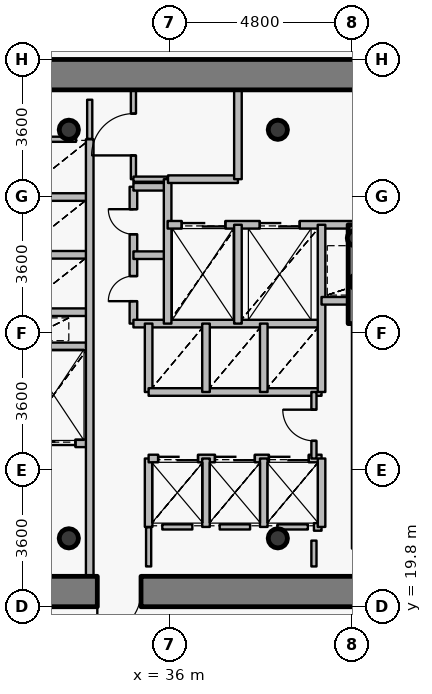
"""IFC4 building model, lengths in metres.
Left out: names, types, materials, properties, quantities, classifications, styles, units other than length and angle.
Written with IfcOpenShell. Run it as: python <this file> out.ifc"""

import sys

from ifc_helpers import new_model, si_unit, direction, frame, frame_2d, origin, origin_2d, place, context, subcontext, project, spatial, rectangle, hollow_circle, extrude, source, transform, mapped, element, fill, save


model = new_model("IFC4")
c1 = context("Model", 3, precision=1e-05, world=origin(), true_north=direction((0.0, 1.0)))
c2 = subcontext(c1, "Body", "Model", "MODEL_VIEW")
j1 = project(units=[si_unit("LENGTHUNIT", "METRE"), si_unit("PLANEANGLEUNIT", "RADIAN")], contexts=[c1])
p1 = place(None, origin())
s1 = spatial("IfcSite", under=j1, at=p1, CompositionType="ELEMENT")
p2 = place(p1, origin())
s2 = spatial("IfcBuilding", under=s1, at=p2, CompositionType="ELEMENT")
p3 = place(p2, frame((0.0, 0.0, 97.2)))
s3 = spatial("IfcBuildingStorey", under=s2, at=p3, CompositionType="ELEMENT", Elevation=97.2)
for number, where, z_axis, x_axis in (
    (1, (33.35, 21.6, 0.0), (0.0, 0.0, 1.0), (1.0, 0.0, 0.0)),
    (2, (38.85, 21.6, 0.0), (0.0, 0.0, 1.0), (1.0, 0.0, 0.0)),
    (3, (38.85, 32.35, 0.0), (0.0, 0.0, 1.0), (1.0, 0.0, 0.0)),
    (4, (33.35, 32.35, 0.0), (0.0, 0.0, 1.0), (1.0, 0.0, 0.0)),
):
    element("IfcColumn", number, at=place(p3, frame(where, z_axis=z_axis, x_axis=x_axis)), inside=s3, PredefinedType="COLUMN", context=c2, shape_type="SweptSolid", body=[
        extrude(hollow_circle(Radius=0.254, WallThickness=0.02, at=origin_2d()), origin(), (0.0, 0.0, 1.0), 3.75),
    ])
for number, where, z_axis, x_axis in (
    (5, (40.95, 28.35, 0.0), (0.0, 0.0, 1.0), (1.0, 0.0, 0.0)),
    (6, (40.88, 29.5, 0.0), (0.0, 0.0, 1.0), (1.0, 0.0, 0.0)),
):
    element("IfcColumn", number, at=place(p3, frame(where, z_axis=z_axis, x_axis=x_axis)), inside=s3, PredefinedType="COLUMN", context=c2, shape_type="SweptSolid", body=[
        extrude(hollow_circle(Radius=0.203, WallThickness=0.016, at=origin_2d()), origin(), (0.0, 0.0, 1.0), 3.75),
    ])
p4 = place(p3, frame((26.6, 33.8, 0.0), z_axis=(0.0, 0.0, 1.0), x_axis=(1.0, 0.0, 0.0)))
e7 = element("IfcWall", 7, at=p4, inside=s3, PredefinedType="SHEAR", context=c2, shape_type="SweptSolid", body=[
    extrude(rectangle(XDim=18.8, YDim=0.8, at=frame_2d((9.4, 0.0))), origin(), (0.0, 0.0, 1.0), 2.95),
])
p5 = place(p3, frame((45.4, 20.2, 0.0), z_axis=(0.0, 0.0, 1.0), x_axis=(-1.0, 0.0, 0.0)))
e8 = element("IfcWall", 8, at=p5, inside=s3, PredefinedType="SHEAR", context=c2, shape_type="SweptSolid", body=[
    extrude(rectangle(XDim=18.8, YDim=0.8, at=frame_2d((9.4, 0.0))), origin(), (0.0, 0.0, 1.0), 2.95),
])
p6 = place(p5, frame((10.15, 0.0, 0.0)))
e9 = element("IfcOpeningElement", 9, at=p6, cuts=e8, PredefinedType="OPENING", context=c2, shape_type="SweptSolid", body=[
    extrude(rectangle(XDim=1.15, YDim=2.15, at=origin_2d()), frame((0.575, 0.41, 1.075), z_axis=(0.0, -1.0, 0.0), x_axis=(1.0, 0.0, 0.0)), (0.0, 0.0, 1.0), 0.82),
])
p7 = place(p3, frame((40.9, 27.25, 0.0), z_axis=(0.0, 0.0, 1.0), x_axis=(0.0, 1.0, 0.0)))
e10 = element("IfcWall", 10, at=p7, inside=s3, PredefinedType="SHEAR", context=c2, shape_type="SweptSolid", body=[
    extrude(rectangle(XDim=2.6, YDim=0.4, at=frame_2d((1.3, 0.0))), origin(), (0.0, 0.0, 1.0), 3.1),
])
p8 = place(p3, frame((32.0, 24.1, 0.0), z_axis=(0.0, 0.0, 1.0), x_axis=(1.0, 0.0, 0.0)))
e11 = element("IfcWall", 11, at=p8, inside=s3, PredefinedType="PARTITIONING", context=c2, shape_type="SweptSolid", body=[
    extrude(rectangle(XDim=1.9, YDim=0.2, at=frame_2d((0.95, 0.0))), origin(), (0.0, 0.0, 1.0), 3.085),
])
p9 = place(p8, frame((0.375, 0.0, 0.0)))
e12 = element("IfcOpeningElement", 12, at=p9, cuts=e11, PredefinedType="OPENING", context=c2, shape_type="SweptSolid", body=[
    extrude(rectangle(XDim=1.15, YDim=2.15, at=origin_2d()), frame((0.575, 0.11, 1.075), z_axis=(0.0, -1.0, 0.0), x_axis=(1.0, 0.0, 0.0)), (0.0, 0.0, 1.0), 0.22),
])
for number, where, z_axis, x_axis in (
    (13, (32.0, 26.65, 0.0), (0.0, 0.0, 1.0), (1.0, 0.0, 0.0)),
    (14, (32.0, 27.55, 0.0), (0.0, 0.0, 1.0), (1.0, 0.0, 0.0)),
    (15, (32.0, 29.06, 0.0), (0.0, 0.0, 1.0), (1.0, 0.0, 0.0)),
    (16, (32.0, 30.58, 0.0), (0.0, 0.0, 1.0), (1.0, 0.0, 0.0)),
):
    element("IfcWall", number, at=place(p3, frame(where, z_axis=z_axis, x_axis=x_axis)), inside=s3, PredefinedType="PARTITIONING", context=c2, shape_type="SweptSolid", body=[
        extrude(rectangle(XDim=1.9, YDim=0.2, at=frame_2d((0.95, 0.0))), origin(), (0.0, 0.0, 1.0), 3.085),
    ])
p10 = place(p3, frame((33.9, 20.6, 0.0), z_axis=(0.0, 0.0, 1.0), x_axis=(0.0, 1.0, 0.0)))
e17 = element("IfcWall", 17, at=p10, inside=s3, PredefinedType="PARTITIONING", context=c2, shape_type="SweptSolid", body=[
    extrude(rectangle(XDim=11.5, YDim=0.2, at=frame_2d((5.75, 0.0))), origin(), (0.0, 0.0, 1.0), 3.085),
])
p11 = place(p3, frame((35.05, 27.25, 0.0), z_axis=(0.0, 0.0, 1.0), x_axis=(0.0, 1.0, 0.0)))
e18 = element("IfcWall", 18, at=p11, inside=s3, PredefinedType="PARTITIONING", context=c2, shape_type="SweptSolid", body=[
    extrude(rectangle(XDim=3.6, YDim=0.2, at=frame_2d((1.8, 0.0))), origin(), (0.0, 0.0, 1.0), 3.5),
])
p12 = place(p11, frame((0.59, 0.0, 0.0)))
e19 = element("IfcOpeningElement", 19, at=p12, cuts=e18, PredefinedType="OPENING", context=c2, shape_type="SweptSolid", body=[
    extrude(rectangle(XDim=0.66, YDim=2.05, at=origin_2d()), frame((0.33, 0.11, 1.025), z_axis=(0.0, -1.0, 0.0), x_axis=(1.0, 0.0, 0.0)), (0.0, 0.0, 1.0), 0.22),
])
p13 = place(p11, frame((2.35, 0.0, 0.0)))
e20 = element("IfcOpeningElement", 20, at=p13, cuts=e18, PredefinedType="OPENING", context=c2, shape_type="SweptSolid", body=[
    extrude(rectangle(XDim=0.66, YDim=2.05, at=origin_2d()), frame((0.33, 0.11, 1.025), z_axis=(0.0, -1.0, 0.0), x_axis=(1.0, 0.0, 0.0)), (0.0, 0.0, 1.0), 0.22),
])
p14 = place(p3, frame((35.05, 27.25, 0.0), z_axis=(0.0, 0.0, 1.0), x_axis=(1.0, 0.0, 0.0)))
e21 = element("IfcWall", 21, at=p14, inside=s3, PredefinedType="PARTITIONING", context=c2, shape_type="SweptSolid", body=[
    extrude(rectangle(XDim=4.95, YDim=0.2, at=frame_2d((2.475, 0.0))), origin(), (0.0, 0.0, 1.0), 3.085),
])
for number, where, z_axis, x_axis in (
    (22, (35.05, 29.05, 0.0), (0.0, 0.0, 1.0), (1.0, 0.0, 0.0)),
    (23, (35.05, 30.85, 0.0), (0.0, 0.0, 1.0), (1.0, 0.0, 0.0)),
):
    element("IfcWall", number, at=place(p3, frame(where, z_axis=z_axis, x_axis=x_axis)), inside=s3, PredefinedType="PARTITIONING", context=c2, shape_type="SweptSolid", body=[
        extrude(rectangle(XDim=0.9, YDim=0.2, at=frame_2d((0.45, 0.0))), origin(), (0.0, 0.0, 1.0), 3.5),
    ])
p15 = place(p3, frame((35.05, 31.05, 0.0), z_axis=(0.0, 0.0, 1.0), x_axis=(0.0, 1.0, 0.0)))
e24 = element("IfcWall", 24, at=p15, inside=s3, PredefinedType="PARTITIONING", context=c2, shape_type="SweptSolid", body=[
    extrude(rectangle(XDim=2.35, YDim=0.135, at=frame_2d((1.175, 0.0))), origin(), (0.0, 0.0, 1.0), 3.085),
])
p16 = place(p15, frame((0.625, 0.0, 0.0)))
e25 = element("IfcOpeningElement", 25, at=p16, cuts=e24, PredefinedType="OPENING", context=c2, shape_type="SweptSolid", body=[
    extrude(rectangle(XDim=1.1, YDim=2.15, at=origin_2d()), frame((0.55, 0.078, 1.075), z_axis=(0.0, -1.0, 0.0), x_axis=(1.0, 0.0, 0.0)), (0.0, 0.0, 1.0), 0.155),
])
p17 = place(p3, frame((35.05, 31.05, 0.0), z_axis=(0.0, 0.0, 1.0), x_axis=(1.0, 0.0, 0.0)))
e26 = element("IfcWall", 26, at=p17, inside=s3, PredefinedType="PARTITIONING", context=c2, shape_type="SweptSolid", body=[
    extrude(rectangle(XDim=0.9, YDim=0.135, at=frame_2d((0.45, 0.0))), origin(), (0.0, 0.0, 1.0), 3.5),
])
p18 = place(p3, frame((35.45, 21.9, 0.0), z_axis=(0.0, 0.0, 1.0), x_axis=(0.0, 1.0, 0.0)))
e27 = element("IfcWall", 27, at=p18, inside=s3, PredefinedType="PARTITIONING", context=c2, shape_type="SweptSolid", body=[
    extrude(rectangle(XDim=1.8, YDim=0.2, at=frame_2d((0.9, 0.0))), origin(), (0.0, 0.0, 1.0), 3.5),
])
p19 = place(p3, frame((35.45, 23.7, 0.0), z_axis=(0.0, 0.0, 1.0), x_axis=(1.0, 0.0, 0.0)))
e28 = element("IfcWall", 28, at=p19, inside=s3, PredefinedType="PARTITIONING", context=c2, shape_type="SweptSolid", body=[
    extrude(rectangle(XDim=4.55, YDim=0.2, at=frame_2d((2.275, 0.0))), origin(), (0.0, 0.0, 1.0), 3.085),
])
p20 = place(p19, frame((0.25, 0.0, 0.0)))
e29 = element("IfcOpeningElement", 29, at=p20, cuts=e28, PredefinedType="OPENING", context=c2, shape_type="SweptSolid", body=[
    extrude(rectangle(XDim=1.05, YDim=2.15, at=origin_2d()), frame((0.525, 0.11, 1.075), z_axis=(0.0, -1.0, 0.0), x_axis=(1.0, 0.0, 0.0)), (0.0, 0.0, 1.0), 0.22),
])
p21 = place(p19, frame((1.745, 0.0, 0.0)))
e30 = element("IfcOpeningElement", 30, at=p21, cuts=e28, PredefinedType="OPENING", context=c2, shape_type="SweptSolid", body=[
    extrude(rectangle(XDim=1.05, YDim=2.15, at=origin_2d()), frame((0.525, 0.11, 1.075), z_axis=(0.0, -1.0, 0.0), x_axis=(1.0, 0.0, 0.0)), (0.0, 0.0, 1.0), 0.22),
])
p22 = place(p19, frame((3.165, 0.0, 0.0)))
e31 = element("IfcOpeningElement", 31, at=p22, cuts=e28, PredefinedType="OPENING", context=c2, shape_type="SweptSolid", body=[
    extrude(rectangle(XDim=1.05, YDim=2.15, at=origin_2d()), frame((0.525, 0.11, 1.075), z_axis=(0.0, -1.0, 0.0), x_axis=(1.0, 0.0, 0.0)), (0.0, 0.0, 1.0), 0.22),
])
p23 = place(p3, frame((35.45, 25.45, 0.0), z_axis=(0.0, 0.0, 1.0), x_axis=(0.0, 1.0, 0.0)))
e32 = element("IfcWall", 32, at=p23, inside=s3, PredefinedType="PARTITIONING", context=c2, shape_type="SweptSolid", body=[
    extrude(rectangle(XDim=1.8, YDim=0.2, at=frame_2d((0.9, 0.0))), origin(), (0.0, 0.0, 1.0), 3.5),
])
p24 = place(p3, frame((35.45, 25.45, 0.0), z_axis=(0.0, 0.0, 1.0), x_axis=(1.0, 0.0, 0.0)))
e33 = element("IfcWall", 33, at=p24, inside=s3, PredefinedType="PARTITIONING", context=c2, shape_type="SweptSolid", body=[
    extrude(rectangle(XDim=4.55, YDim=0.2, at=frame_2d((2.275, 0.0))), origin(), (0.0, 0.0, 1.0), 3.085),
])
p25 = place(p3, frame((35.95, 27.25, 0.0), z_axis=(0.0, 0.0, 1.0), x_axis=(0.0, 1.0, 0.0)))
e34 = element("IfcWall", 34, at=p25, inside=s3, PredefinedType="PARTITIONING", context=c2, shape_type="SweptSolid", body=[
    extrude(rectangle(XDim=3.8, YDim=0.2, at=frame_2d((1.9, 0.0))), origin(), (0.0, 0.0, 1.0), 3.5),
])
p26 = place(p3, frame((35.95, 29.85, 0.0), z_axis=(0.0, 0.0, 1.0), x_axis=(1.0, 0.0, 0.0)))
e35 = element("IfcWall", 35, at=p26, inside=s3, PredefinedType="PARTITIONING", context=c2, shape_type="SweptSolid", body=[
    extrude(rectangle(XDim=8.49, YDim=0.2, at=frame_2d((4.245, 0.0))), origin(), (0.0, 0.0, 1.0), 3.085),
])
p27 = place(p26, frame((6.1, 0.0, 0.0)))
e36 = element("IfcOpeningElement", 36, at=p27, cuts=e35, PredefinedType="OPENING", context=c2, shape_type="SweptSolid", body=[
    extrude(rectangle(XDim=1.2, YDim=2.15, at=origin_2d()), frame((0.6, 0.11, 1.075), z_axis=(0.0, -1.0, 0.0), x_axis=(1.0, 0.0, 0.0)), (0.0, 0.0, 1.0), 0.22),
])
p28 = place(p26, frame((0.37, 0.0, 0.0)))
e37 = element("IfcOpeningElement", 37, at=p28, cuts=e35, PredefinedType="OPENING", context=c2, shape_type="SweptSolid", body=[
    extrude(rectangle(XDim=1.15, YDim=2.15, at=origin_2d()), frame((0.575, 0.11, 1.075), z_axis=(0.0, -1.0, 0.0), x_axis=(1.0, 0.0, 0.0)), (0.0, 0.0, 1.0), 0.22),
])
p29 = place(p26, frame((2.425, 0.0, 0.0)))
e38 = element("IfcOpeningElement", 38, at=p29, cuts=e35, PredefinedType="OPENING", context=c2, shape_type="SweptSolid", body=[
    extrude(rectangle(XDim=1.05, YDim=2.15, at=origin_2d()), frame((0.525, 0.11, 1.075), z_axis=(0.0, -1.0, 0.0), x_axis=(1.0, 0.0, 0.0)), (0.0, 0.0, 1.0), 0.22),
])
p30 = place(p3, frame((35.96, 31.05, 0.0), z_axis=(0.0, 0.0, 1.0), x_axis=(1.0, 0.0, 0.0)))
e39 = element("IfcWall", 39, at=p30, inside=s3, PredefinedType="PARTITIONING", context=c2, shape_type="SweptSolid", body=[
    extrude(rectangle(XDim=1.84, YDim=0.2, at=frame_2d((0.92, 0.0))), origin(), (0.0, 0.0, 1.0), 3.5),
])
for number, where, z_axis, x_axis in (
    (40, (36.96, 21.9, 0.0), (0.0, 0.0, 1.0), (0.0, 1.0, 0.0)),
    (41, (36.96, 25.45, 0.0), (0.0, 0.0, 1.0), (0.0, 1.0, 0.0)),
):
    element("IfcWall", number, at=place(p3, frame(where, z_axis=z_axis, x_axis=x_axis)), inside=s3, PredefinedType="PARTITIONING", context=c2, shape_type="SweptSolid", body=[
        extrude(rectangle(XDim=1.8, YDim=0.2, at=frame_2d((0.9, 0.0))), origin(), (0.0, 0.0, 1.0), 3.5),
    ])
p31 = place(p3, frame((37.8, 27.25, 0.0), z_axis=(0.0, 0.0, 1.0), x_axis=(0.0, 1.0, 0.0)))
e42 = element("IfcWall", 42, at=p31, inside=s3, PredefinedType="PARTITIONING", context=c2, shape_type="SweptSolid", body=[
    extrude(rectangle(XDim=2.6, YDim=0.2, at=frame_2d((1.3, 0.0))), origin(), (0.0, 0.0, 1.0), 3.5),
])
p32 = place(p3, frame((37.8, 31.05, 0.0), z_axis=(0.0, 0.0, 1.0), x_axis=(0.0, 1.0, 0.0)))
e43 = element("IfcWall", 43, at=p32, inside=s3, PredefinedType="PARTITIONING", context=c2, shape_type="SweptSolid", body=[
    extrude(rectangle(XDim=2.35, YDim=0.2, at=frame_2d((1.175, 0.0))), origin(), (0.0, 0.0, 1.0), 3.085),
])
for number, where, z_axis, x_axis in (
    (44, (38.48, 21.9, 0.0), (0.0, 0.0, 1.0), (0.0, 1.0, 0.0)),
    (45, (38.48, 25.45, 0.0), (0.0, 0.0, 1.0), (0.0, 1.0, 0.0)),
):
    element("IfcWall", number, at=place(p3, frame(where, z_axis=z_axis, x_axis=x_axis)), inside=s3, PredefinedType="PARTITIONING", context=c2, shape_type="SweptSolid", body=[
        extrude(rectangle(XDim=1.8, YDim=0.2, at=frame_2d((0.9, 0.0))), origin(), (0.0, 0.0, 1.0), 3.5),
    ])
p33 = place(p3, frame((39.8, 21.9, 0.0), z_axis=(0.0, 0.0, 1.0), x_axis=(1.0, 0.0, 0.0)))
e46 = element("IfcWall", 46, at=p33, inside=s3, PredefinedType="PARTITIONING", context=c2, shape_type="SweptSolid", body=[
    extrude(rectangle(XDim=0.2, YDim=0.2, at=frame_2d((0.1, 0.0))), origin(), (0.0, 0.0, 1.0), 3.5),
])
p34 = place(p3, frame((39.8, 23.7, 0.0), z_axis=(0.0, 0.0, 1.0), x_axis=(0.0, 1.0, 0.0)))
e47 = element("IfcWall", 47, at=p34, inside=s3, PredefinedType="PARTITIONING", context=c2, shape_type="SweptSolid", body=[
    extrude(rectangle(XDim=1.75, YDim=0.135, at=frame_2d((0.875, 0.0))), origin(), (0.0, 0.0, 1.0), 3.5),
])
p35 = place(p34, frame((0.465, 0.0, 0.0)))
e48 = element("IfcOpeningElement", 48, at=p35, cuts=e47, PredefinedType="OPENING", context=c2, shape_type="SweptSolid", body=[
    extrude(rectangle(XDim=0.82, YDim=2.1, at=origin_2d()), frame((0.41, 0.078, 1.05), z_axis=(0.0, -1.0, 0.0), x_axis=(1.0, 0.0, 0.0)), (0.0, 0.0, 1.0), 0.155),
])
p36 = place(p3, frame((40.0, 21.9, 0.0), z_axis=(0.0, 0.0, 1.0), x_axis=(0.0, 1.0, 0.0)))
e49 = element("IfcWall", 49, at=p36, inside=s3, PredefinedType="PARTITIONING", context=c2, shape_type="SweptSolid", body=[
    extrude(rectangle(XDim=1.8, YDim=0.2, at=frame_2d((0.9, 0.0))), origin(), (0.0, 0.0, 1.0), 3.5),
])
p37 = place(p3, frame((40.0, 25.45, 0.0), z_axis=(0.0, 0.0, 1.0), x_axis=(0.0, 1.0, 0.0)))
e50 = element("IfcWall", 50, at=p37, inside=s3, PredefinedType="PARTITIONING", context=c2, shape_type="SweptSolid", body=[
    extrude(rectangle(XDim=4.4, YDim=0.2, at=frame_2d((2.2, 0.0))), origin(), (0.0, 0.0, 1.0), 3.5),
])
p38 = place(p3, frame((40.0, 27.85, 0.0), z_axis=(0.0, 0.0, 1.0), x_axis=(1.0, 0.0, 0.0)))
e51 = element("IfcWall", 51, at=p38, inside=s3, PredefinedType="PARTITIONING", context=c2, shape_type="SweptSolid", body=[
    extrude(rectangle(XDim=0.9, YDim=0.2, at=frame_2d((0.45, 0.0))), origin(), (0.0, 0.0, 1.0), 3.5),
])
p39 = place(p3, frame((40.9, 21.33, 0.0), z_axis=(0.0, 0.0, 1.0), x_axis=(0.0, 1.0, 0.0)))
e52 = element("IfcWall", 52, at=p39, inside=s3, PredefinedType="PARTITIONING", context=c2, shape_type="SweptSolid", body=[
    extrude(rectangle(XDim=5.91, YDim=0.2, at=frame_2d((2.955, 0.0))), origin(), (0.0, 0.0, 1.0), 3.035),
])
p40 = place(p3, frame((36.6, 21.9, 0.0), z_axis=(0.0, 0.0, 1.0), x_axis=(-1.0, 0.0, 0.0)))
e53 = element("IfcWall", 53, at=p40, inside=s3, PredefinedType="PARTITIONING", context=c2, shape_type="SweptSolid", body=[
    extrude(rectangle(XDim=0.79, YDim=0.135, at=frame_2d((0.395, 0.0))), origin(), (0.0, 0.0, 1.0), 3.5),
])
p41 = place(p3, frame((38.12, 21.9, 0.0), z_axis=(0.0, 0.0, 1.0), x_axis=(-1.0, 0.0, 0.0)))
e54 = element("IfcWall", 54, at=p41, inside=s3, PredefinedType="PARTITIONING", context=c2, shape_type="SweptSolid", body=[
    extrude(rectangle(XDim=0.8, YDim=0.135, at=frame_2d((0.4, 0.0))), origin(), (0.0, 0.0, 1.0), 3.5),
])
p42 = place(p3, frame((39.64, 21.9, 0.0), z_axis=(0.0, 0.0, 1.0), x_axis=(-1.0, 0.0, 0.0)))
e55 = element("IfcWall", 55, at=p42, inside=s3, PredefinedType="PARTITIONING", context=c2, shape_type="SweptSolid", body=[
    extrude(rectangle(XDim=0.8, YDim=0.135, at=frame_2d((0.4, 0.0))), origin(), (0.0, 0.0, 1.0), 3.085),
])
p43 = place(p3, frame((32.36, 32.1, 0.0), z_axis=(0.0, 0.0, 1.0), x_axis=(1.0, 0.0, 0.0)))
e56 = element("IfcWall", 56, at=p43, inside=s3, PredefinedType="PARTITIONING", context=c2, shape_type="SweptSolid", body=[
    extrude(rectangle(XDim=1.18, YDim=0.135, at=frame_2d((0.59, 0.0))), origin(), (0.0, 0.0, 1.0), 3.085),
])
p44 = place(p3, frame((39.8, 20.86, 0.0), z_axis=(0.0, 0.0, 1.0), x_axis=(0.0, 1.0, 0.0)))
e57 = element("IfcWall", 57, at=p44, inside=s3, PredefinedType="PARTITIONING", context=c2, shape_type="SweptSolid", body=[
    extrude(rectangle(XDim=0.68, YDim=0.135, at=frame_2d((0.34, 0.0))), origin(), (0.0, 0.0, 1.0), 3.035),
])
for number, where, z_axis, x_axis in (
    (58, (35.45, 21.89, 0.0), (0.0, 0.0, 1.0), (0.0, -1.0, 0.0)),
    (59, (33.9, 32.11, 0.0), (0.0, 0.0, 1.0), (0.0, 1.0, 0.0)),
):
    element("IfcWall", number, at=place(p3, frame(where, z_axis=z_axis, x_axis=x_axis)), inside=s3, PredefinedType="PARTITIONING", context=c2, shape_type="SweptSolid", body=[
        extrude(rectangle(XDim=1.03, YDim=0.135, at=frame_2d((0.515, 0.0))), origin(), (0.0, 0.0, 1.0), 3.085),
    ])
m1 = source(origin(), c2, "Body", "SweptSolid", [
    extrude(rectangle(XDim=1.15, YDim=2.15, at=origin_2d()), frame((0.575, 0.025, 1.075), z_axis=(0.0, -1.0, 0.0), x_axis=(1.0, 0.0, 0.0)), (0.0, 0.0, 1.0), 0.05),
])
p45 = place(p6, origin())
e60 = element("IfcDoor", 60, at=p45, inside=s3, OperationType="SINGLE_SWING_RIGHT", PredefinedType="DOOR", context=c2, shape_type="MappedRepresentation", body=[
    mapped(m1, transform((0.0, 0.0, 0.0), x_axis=(1.0, 0.0, 0.0), y_axis=(0.0, 1.0, 0.0), z_axis=(0.0, 0.0, 1.0), scale=1.0)),
])
fill(e9, e60)
m2 = source(origin(), c2, "Body", "SweptSolid", [
    extrude(rectangle(XDim=1.15, YDim=2.15, at=origin_2d()), frame((0.575, 0.025, 1.075), z_axis=(0.0, -1.0, 0.0), x_axis=(1.0, 0.0, 0.0)), (0.0, 0.0, 1.0), 0.05),
])
p46 = place(p28, origin())
e61 = element("IfcDoor", 61, at=p46, inside=s3, OperationType="DOUBLE_DOOR_SLIDING", PredefinedType="USERDEFINED", context=c2, shape_type="MappedRepresentation", body=[
    mapped(m2, transform((0.0, 0.0, 0.0), x_axis=(1.0, 0.0, 0.0), y_axis=(0.0, 1.0, 0.0), z_axis=(0.0, 0.0, 1.0), scale=1.0)),
])
fill(e37, e61)
p47 = place(p9, origin())
e62 = element("IfcDoor", 62, at=p47, inside=s3, OperationType="DOUBLE_DOOR_SLIDING", PredefinedType="USERDEFINED", context=c2, shape_type="MappedRepresentation", body=[
    mapped(m2, transform((0.0, 0.0, 0.0), x_axis=(1.0, 0.0, 0.0), y_axis=(0.0, 1.0, 0.0), z_axis=(0.0, 0.0, 1.0), scale=1.0)),
])
fill(e12, e62)
m3 = source(origin(), c2, "Body", "SweptSolid", [
    extrude(rectangle(XDim=1.05, YDim=2.15, at=origin_2d()), frame((0.525, 0.025, 1.075), z_axis=(0.0, -1.0, 0.0), x_axis=(1.0, 0.0, 0.0)), (0.0, 0.0, 1.0), 0.05),
])
p48 = place(p29, origin())
e63 = element("IfcDoor", 63, at=p48, inside=s3, OperationType="DOUBLE_DOOR_SLIDING", PredefinedType="USERDEFINED", context=c2, shape_type="MappedRepresentation", body=[
    mapped(m3, transform((0.0, 0.0, 0.0), x_axis=(1.0, 0.0, 0.0), y_axis=(0.0, 1.0, 0.0), z_axis=(0.0, 0.0, 1.0), scale=1.0)),
])
fill(e38, e63)
p49 = place(p20, origin())
e64 = element("IfcDoor", 64, at=p49, inside=s3, OperationType="DOUBLE_DOOR_SLIDING", PredefinedType="USERDEFINED", context=c2, shape_type="MappedRepresentation", body=[
    mapped(m3, transform((0.0, 0.0, 0.0), x_axis=(1.0, 0.0, 0.0), y_axis=(0.0, 1.0, 0.0), z_axis=(0.0, 0.0, 1.0), scale=1.0)),
])
fill(e29, e64)
p50 = place(p21, origin())
e65 = element("IfcDoor", 65, at=p50, inside=s3, OperationType="DOUBLE_DOOR_SLIDING", PredefinedType="USERDEFINED", context=c2, shape_type="MappedRepresentation", body=[
    mapped(m3, transform((0.0, 0.0, 0.0), x_axis=(1.0, 0.0, 0.0), y_axis=(0.0, 1.0, 0.0), z_axis=(0.0, 0.0, 1.0), scale=1.0)),
])
fill(e30, e65)
p51 = place(p22, origin())
e66 = element("IfcDoor", 66, at=p51, inside=s3, OperationType="DOUBLE_DOOR_SLIDING", PredefinedType="USERDEFINED", context=c2, shape_type="MappedRepresentation", body=[
    mapped(m3, transform((0.0, 0.0, 0.0), x_axis=(1.0, 0.0, 0.0), y_axis=(0.0, 1.0, 0.0), z_axis=(0.0, 0.0, 1.0), scale=1.0)),
])
fill(e31, e66)
m4 = source(origin(), c2, "Body", "SweptSolid", [
    extrude(rectangle(XDim=0.66, YDim=2.05, at=origin_2d()), frame((0.33, 0.025, 1.025), z_axis=(0.0, -1.0, 0.0), x_axis=(1.0, 0.0, 0.0)), (0.0, 0.0, 1.0), 0.05),
])
p52 = place(p12, origin())
e67 = element("IfcDoor", 67, at=p52, inside=s3, OperationType="SINGLE_SWING_LEFT", PredefinedType="USERDEFINED", context=c2, shape_type="MappedRepresentation", body=[
    mapped(m4, transform((0.0, 0.0, 0.0), x_axis=(1.0, 0.0, 0.0), y_axis=(0.0, 1.0, 0.0), z_axis=(0.0, 0.0, 1.0), scale=1.0)),
])
fill(e19, e67)
p53 = place(p13, origin())
e68 = element("IfcDoor", 68, at=p53, inside=s3, OperationType="SINGLE_SWING_RIGHT", PredefinedType="USERDEFINED", context=c2, shape_type="MappedRepresentation", body=[
    mapped(m4, transform((0.0, 0.0, 0.0), x_axis=(1.0, 0.0, 0.0), y_axis=(0.0, 1.0, 0.0), z_axis=(0.0, 0.0, 1.0), scale=1.0)),
])
fill(e20, e68)
m5 = source(origin(), c2, "Body", "SweptSolid", [
    extrude(rectangle(XDim=1.1, YDim=2.15, at=origin_2d()), frame((0.55, 0.025, 1.075), z_axis=(0.0, -1.0, 0.0), x_axis=(1.0, 0.0, 0.0)), (0.0, 0.0, 1.0), 0.05),
])
p54 = place(p16, origin())
e69 = element("IfcDoor", 69, at=p54, inside=s3, OperationType="SINGLE_SWING_LEFT", PredefinedType="DOOR", context=c2, shape_type="MappedRepresentation", body=[
    mapped(m5, transform((0.0, 0.0, 0.0), x_axis=(1.0, 0.0, 0.0), y_axis=(0.0, 1.0, 0.0), z_axis=(0.0, 0.0, 1.0), scale=1.0)),
])
fill(e25, e69)
m6 = source(origin(), c2, "Body", "SweptSolid", [
    extrude(rectangle(XDim=0.82, YDim=2.1, at=origin_2d()), frame((0.41, 0.025, 1.05), z_axis=(0.0, -1.0, 0.0), x_axis=(1.0, 0.0, 0.0)), (0.0, 0.0, 1.0), 0.05),
])
p55 = place(p35, origin())
e70 = element("IfcDoor", 70, at=p55, inside=s3, OperationType="SINGLE_SWING_RIGHT", PredefinedType="DOOR", context=c2, shape_type="MappedRepresentation", body=[
    mapped(m6, transform((0.0, 0.0, 0.0), x_axis=(1.0, 0.0, 0.0), y_axis=(0.0, 1.0, 0.0), z_axis=(0.0, 0.0, 1.0), scale=1.0)),
])
fill(e48, e70)
save(model, sys.argv[1])
